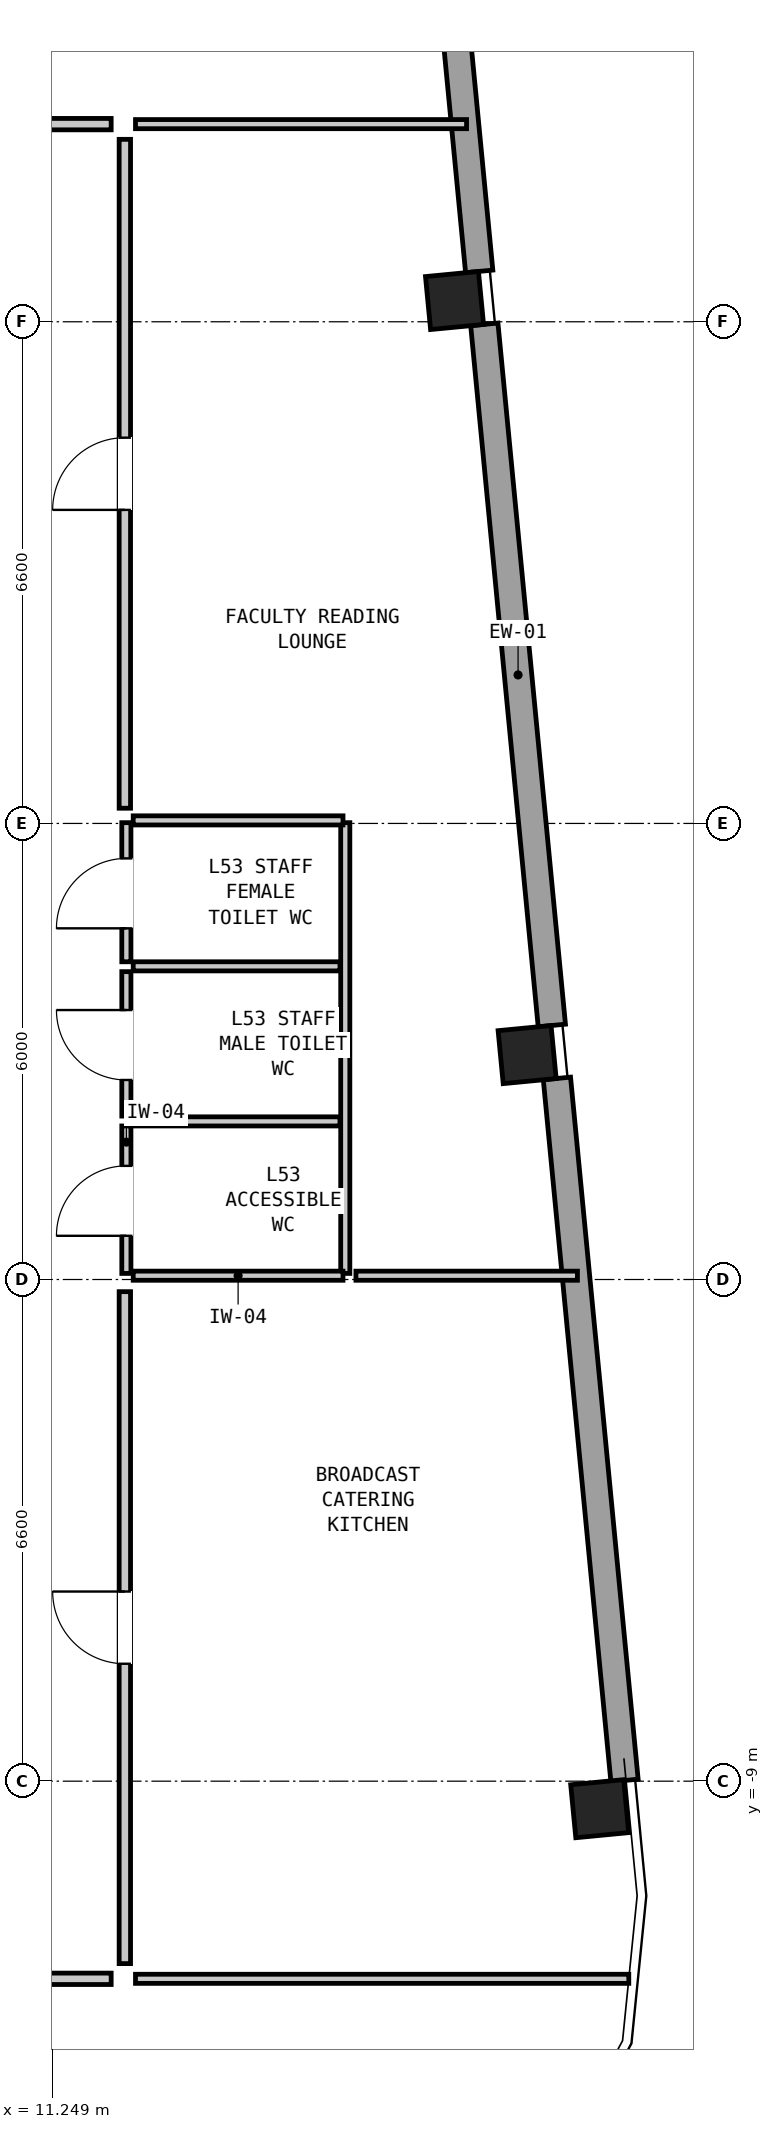
"""IFC4 building model, lengths in metres.
Left out: names, types, materials, properties, quantities, classifications, styles, units other than length and angle.
Written with IfcOpenShell. Run it as: python <this file> out.ifc"""

import sys

from ifc_helpers import new_model, si_unit, direction, frame, frame_2d, origin, origin_2d, place, context, subcontext, project, spatial, rectangle, hollow_rectangle, extrude, element, fill, save


model = new_model("IFC4")
c1 = context("Model", 3, precision=1e-05, world=origin(), true_north=direction((0.0, 1.0)))
c2 = subcontext(c1, "Body", "Model", "MODEL_VIEW")
j1 = project(units=[si_unit("LENGTHUNIT", "METRE"), si_unit("PLANEANGLEUNIT", "RADIAN")], contexts=[c1])
p1 = place(None, origin())
s1 = spatial("IfcSite", under=j1, at=p1, CompositionType="ELEMENT")
p2 = place(p1, origin())
s2 = spatial("IfcBuilding", under=s1, at=p2, CompositionType="ELEMENT")
p3 = place(p2, frame((0.0, 0.0, 180.55)))
s3 = spatial("IfcBuildingStorey", under=s2, at=p3, CompositionType="ELEMENT", Elevation=180.55)
for number, where, z_axis, x_axis in (
    (1, (18.448, -9.362, 0.0), (0.0, 0.0, 1.0), (-0.096, 0.995, 0.0)),
    (2, (17.493, 0.559, 0.0), (0.0, 0.0, 1.0), (-0.096, 0.995, 0.0)),
    (3, (16.537, 10.479, 0.0), (0.0, 0.0, 1.0), (-0.096, 0.995, 0.0)),
):
    element("IfcColumn", number, at=place(p3, frame(where, z_axis=z_axis, x_axis=x_axis)), inside=s3, PredefinedType="COLUMN", context=c2, shape_type="SweptSolid", body=[
        extrude(hollow_rectangle(XDim=0.7, YDim=0.7, WallThickness=0.045, at=origin_2d()), origin(), (0.0, 0.0, 1.0), 3.05),
    ])
p4 = place(p3, frame((15.973, 20.098, 0.0), z_axis=(0.0, 0.0, 1.0), x_axis=(0.095829727039, -0.995397741315, 0.0)))
e4 = element("IfcWall", 4, at=p4, inside=s3, PredefinedType="SOLIDWALL", context=c2, shape_type="SweptSolid", body=[
    extrude(rectangle(XDim=9.279, YDim=0.36, at=frame_2d((4.639, 0.0))), origin(), (0.0, 0.0, 1.0), 0.95),
])
p5 = place(p3, frame((16.929, 10.166, 0.0), z_axis=(0.0, 0.0, 1.0), x_axis=(0.095845939971, -0.995396180318, 0.0)))
e5 = element("IfcWall", 5, at=p5, inside=s3, PredefinedType="SOLIDWALL", context=c2, shape_type="SweptSolid", body=[
    extrude(rectangle(XDim=9.267, YDim=0.36, at=frame_2d((4.633, 0.0))), origin(), (0.0, 0.0, 1.0), 0.95),
])
p6 = place(p3, frame((17.885, 0.245, 0.0), z_axis=(0.0, 0.0, 1.0), x_axis=(0.095829727039, -0.995397741315, 0.0)))
e6 = element("IfcWall", 6, at=p6, inside=s3, PredefinedType="SOLIDWALL", context=c2, shape_type="SweptSolid", body=[
    extrude(rectangle(XDim=9.279, YDim=0.36, at=frame_2d((4.639, 0.0))), origin(), (0.0, 0.0, 1.0), 0.95),
])
p7 = place(p3, frame((12.22, -2.32, 0.0), z_axis=(0.0, 0.0, 1.0), x_axis=(0.0, 1.0, 0.0)))
e7 = element("IfcWall", 7, at=p7, inside=s3, PredefinedType="PARTITIONING", context=c2, shape_type="SweptSolid", body=[
    extrude(rectangle(XDim=1.94, YDim=0.12, at=frame_2d((0.97, 0.0))), origin(), (0.0, 0.0, 1.0), 2.83),
])
p8 = place(p7, frame((0.495, 0.0, 0.0)))
e8 = element("IfcOpeningElement", 8, at=p8, cuts=e7, PredefinedType="OPENING", context=c2, shape_type="SweptSolid", body=[
    extrude(rectangle(XDim=0.92, YDim=2.1, at=frame_2d((0.46, 1.05))), frame((0.0, 0.072, 0.0), z_axis=(0.0, -1.0, 0.0), x_axis=(1.0, 0.0, 0.0)), (0.0, 0.0, 1.0), 0.144),
])
p9 = place(p3, frame((12.22, -0.25, 0.0), z_axis=(0.0, 0.0, 1.0), x_axis=(0.0, 1.0, 0.0)))
e9 = element("IfcWall", 9, at=p9, inside=s3, PredefinedType="PARTITIONING", context=c2, shape_type="SweptSolid", body=[
    extrude(rectangle(XDim=1.9, YDim=0.12, at=frame_2d((0.95, 0.0))), origin(), (0.0, 0.0, 1.0), 2.83),
])
p10 = place(p9, frame((0.475, 0.0, 0.0)))
e10 = element("IfcOpeningElement", 10, at=p10, cuts=e9, PredefinedType="OPENING", context=c2, shape_type="SweptSolid", body=[
    extrude(rectangle(XDim=0.92, YDim=2.1, at=frame_2d((0.46, 1.05))), frame((0.0, 0.072, 0.0), z_axis=(0.0, -1.0, 0.0), x_axis=(1.0, 0.0, 0.0)), (0.0, 0.0, 1.0), 0.144),
])
p11 = place(p3, frame((12.22, 1.78, 0.0), z_axis=(0.0, 0.0, 1.0), x_axis=(0.0, 1.0, 0.0)))
e11 = element("IfcWall", 11, at=p11, inside=s3, PredefinedType="PARTITIONING", context=c2, shape_type="SweptSolid", body=[
    extrude(rectangle(XDim=1.83, YDim=0.12, at=frame_2d((0.915, 0.0))), origin(), (0.0, 0.0, 1.0), 2.83),
])
p12 = place(p11, frame((0.44, 0.0, 0.0)))
e12 = element("IfcOpeningElement", 12, at=p12, cuts=e11, PredefinedType="OPENING", context=c2, shape_type="SweptSolid", body=[
    extrude(rectangle(XDim=0.92, YDim=2.1, at=frame_2d((0.46, 1.05))), frame((0.0, 0.072, 0.0), z_axis=(0.0, -1.0, 0.0), x_axis=(1.0, 0.0, 0.0)), (0.0, 0.0, 1.0), 0.144),
])
p13 = place(p3, frame((15.1, -2.32, 0.0), z_axis=(0.0, 0.0, 1.0), x_axis=(0.0, 1.0, 0.0)))
e13 = element("IfcWall", 13, at=p13, inside=s3, PredefinedType="PARTITIONING", context=c2, shape_type="SweptSolid", body=[
    extrude(rectangle(XDim=5.93, YDim=0.12, at=frame_2d((2.965, 0.0))), origin(), (0.0, 0.0, 1.0), 2.83),
])
for number, where, z_axis, x_axis in (
    (14, (12.31, -2.35, 0.0), (0.0, 0.0, 1.0), (1.0, 0.0, 0.0)),
    (15, (12.31, 3.64, 0.0), (0.0, 0.0, 1.0), (1.0, 0.0, 0.0)),
):
    element("IfcWall", number, at=place(p3, frame(where, z_axis=z_axis, x_axis=x_axis)), inside=s3, PredefinedType="PARTITIONING", context=c2, shape_type="SweptSolid", body=[
        extrude(rectangle(XDim=2.76, YDim=0.12, at=frame_2d((1.38, 0.0))), origin(), (0.0, 0.0, 1.0), 1.01),
    ])
for number, where, z_axis, x_axis in (
    (16, (12.31, -0.32, 0.0), (0.0, 0.0, 1.0), (1.0, 0.0, 0.0)),
    (17, (12.31, 1.72, 0.0), (0.0, 0.0, 1.0), (1.0, 0.0, 0.0)),
):
    element("IfcWall", number, at=place(p3, frame(where, z_axis=z_axis, x_axis=x_axis)), inside=s3, PredefinedType="PARTITIONING", context=c2, shape_type="SweptSolid", body=[
        extrude(rectangle(XDim=2.72, YDim=0.12, at=frame_2d((1.36, 0.0))), origin(), (0.0, 0.0, 1.0), 2.83),
    ])
p14 = place(p3, frame((12.34, 12.8, 0.0), z_axis=(0.0, 0.0, 1.0), x_axis=(1.0, 0.0, 0.0)))
e18 = element("IfcWall", 18, at=p14, inside=s3, PredefinedType="PARTITIONING", context=c2, shape_type="SweptSolid", body=[
    extrude(rectangle(XDim=4.355, YDim=0.12, at=frame_2d((2.178, 0.0))), origin(), (0.0, 0.0, 1.0), 2.83),
])
p15 = place(p3, frame((12.34, -11.6, 0.0), z_axis=(0.0, 0.0, 1.0), x_axis=(1.0, 0.0, 0.0)))
e19 = element("IfcWall", 19, at=p15, inside=s3, PredefinedType="PARTITIONING", context=c2, shape_type="SweptSolid", body=[
    extrude(rectangle(XDim=6.49, YDim=0.12, at=frame_2d((3.245, 0.0))), origin(), (0.0, 0.0, 1.0), 2.347),
])
p16 = place(p3, frame((15.24, -2.35, 0.0), z_axis=(0.0, 0.0, 1.0), x_axis=(1.0, 0.0, 0.0)))
e20 = element("IfcWall", 20, at=p16, inside=s3, PredefinedType="PARTITIONING", context=c2, shape_type="SweptSolid", body=[
    extrude(rectangle(XDim=2.914, YDim=0.12, at=frame_2d((1.457, 0.0))), origin(), (0.0, 0.0, 1.0), 1.01),
])
p17 = place(p3, frame((5.58, 12.8, 0.0), z_axis=(0.0, 0.0, 1.0), x_axis=(1.0, 0.0, 0.0)))
e21 = element("IfcWall", 21, at=p17, inside=s3, PredefinedType="PARTITIONING", context=c2, shape_type="SweptSolid", body=[
    extrude(rectangle(XDim=6.44, YDim=0.15, at=frame_2d((3.22, 0.0))), origin(), (0.0, 0.0, 1.0), 2.83),
])
p18 = place(p17, frame((2.22, 0.0, 0.0)))
e22 = element("IfcOpeningElement", 22, at=p18, cuts=e21, PredefinedType="OPENING", context=c2, shape_type="SweptSolid", body=[
    extrude(rectangle(XDim=1.2, YDim=2.1, at=frame_2d((0.6, 1.05))), frame((0.0, 0.087, 0.0), z_axis=(0.0, -1.0, 0.0), x_axis=(1.0, 0.0, 0.0)), (0.0, 0.0, 1.0), 0.174),
])
p19 = place(p3, frame((0.18, -11.6, 0.0), z_axis=(0.0, 0.0, 1.0), x_axis=(1.0, 0.0, 0.0)))
e23 = element("IfcWall", 23, at=p19, inside=s3, PredefinedType="PARTITIONING", context=c2, shape_type="SweptSolid", body=[
    extrude(rectangle(XDim=11.84, YDim=0.15, at=frame_2d((5.92, 0.0))), origin(), (0.0, 0.0, 1.0), 2.347),
])
p20 = place(p19, frame((5.32, 0.0, 0.0)))
e24 = element("IfcOpeningElement", 24, at=p20, cuts=e23, PredefinedType="OPENING", context=c2, shape_type="SweptSolid", body=[
    extrude(rectangle(XDim=1.2, YDim=2.1, at=frame_2d((0.6, 1.05))), frame((0.0, 0.087, 0.0), z_axis=(0.0, -1.0, 0.0), x_axis=(1.0, 0.0, 0.0)), (0.0, 0.0, 1.0), 0.174),
])
p21 = place(p3, frame((12.2, -11.4, 0.0), z_axis=(0.0, 0.0, 1.0), x_axis=(0.0, 1.0, 0.0)))
e25 = element("IfcWall", 25, at=p21, inside=s3, PredefinedType="PARTITIONING", context=c2, shape_type="SweptSolid", body=[
    extrude(rectangle(XDim=8.84, YDim=0.15, at=frame_2d((4.42, 0.0))), origin(), (0.0, 0.0, 1.0), 2.83),
])
p22 = place(p21, frame((3.945, 0.0, 0.0)))
e26 = element("IfcOpeningElement", 26, at=p22, cuts=e25, PredefinedType="OPENING", context=c2, shape_type="SweptSolid", body=[
    extrude(rectangle(XDim=0.95, YDim=2.1, at=frame_2d((0.475, 1.05))), frame((0.0, 0.087, 0.0), z_axis=(0.0, -1.0, 0.0), x_axis=(1.0, 0.0, 0.0)), (0.0, 0.0, 1.0), 0.174),
])
p23 = place(p3, frame((12.2, 3.8, 0.0), z_axis=(0.0, 0.0, 1.0), x_axis=(0.0, 1.0, 0.0)))
e27 = element("IfcWall", 27, at=p23, inside=s3, PredefinedType="PARTITIONING", context=c2, shape_type="SweptSolid", body=[
    extrude(rectangle(XDim=8.8, YDim=0.15, at=frame_2d((4.4, 0.0))), origin(), (0.0, 0.0, 1.0), 2.83),
])
p24 = place(p23, frame((3.925, 0.0, 0.0)))
e28 = element("IfcOpeningElement", 28, at=p24, cuts=e27, PredefinedType="OPENING", context=c2, shape_type="SweptSolid", body=[
    extrude(rectangle(XDim=0.95, YDim=2.1, at=frame_2d((0.475, 1.05))), frame((0.0, 0.087, 0.0), z_axis=(0.0, -1.0, 0.0), x_axis=(1.0, 0.0, 0.0)), (0.0, 0.0, 1.0), 0.174),
])
p25 = place(p8, origin())
e29 = element("IfcDoor", 29, at=p25, inside=s3, OperationType="SINGLE_SWING_LEFT", PredefinedType="DOOR", context=c2, shape_type="SweptSolid", body=[
    extrude(rectangle(XDim=0.92, YDim=2.1, at=frame_2d((0.46, 1.05))), frame((0.0, 0.025, 0.0), z_axis=(0.0, -1.0, 0.0), x_axis=(1.0, 0.0, 0.0)), (0.0, 0.0, 1.0), 0.05),
])
fill(e8, e29)
p26 = place(p10, origin())
e30 = element("IfcDoor", 30, at=p26, inside=s3, OperationType="SINGLE_SWING_RIGHT", PredefinedType="DOOR", context=c2, shape_type="SweptSolid", body=[
    extrude(rectangle(XDim=0.92, YDim=2.1, at=frame_2d((0.46, 1.05))), frame((0.0, 0.025, 0.0), z_axis=(0.0, -1.0, 0.0), x_axis=(1.0, 0.0, 0.0)), (0.0, 0.0, 1.0), 0.05),
])
fill(e10, e30)
p27 = place(p12, origin())
e31 = element("IfcDoor", 31, at=p27, inside=s3, OperationType="SINGLE_SWING_LEFT", PredefinedType="DOOR", context=c2, shape_type="SweptSolid", body=[
    extrude(rectangle(XDim=0.92, YDim=2.1, at=frame_2d((0.46, 1.05))), frame((0.0, 0.025, 0.0), z_axis=(0.0, -1.0, 0.0), x_axis=(1.0, 0.0, 0.0)), (0.0, 0.0, 1.0), 0.05),
])
fill(e12, e31)
p28 = place(p22, origin())
e32 = element("IfcDoor", 32, at=p28, inside=s3, OperationType="SINGLE_SWING_RIGHT", PredefinedType="DOOR", context=c2, shape_type="SweptSolid", body=[
    extrude(rectangle(XDim=0.95, YDim=2.1, at=frame_2d((0.475, 1.05))), frame((0.0, 0.025, 0.0), z_axis=(0.0, -1.0, 0.0), x_axis=(1.0, 0.0, 0.0)), (0.0, 0.0, 1.0), 0.05),
])
fill(e26, e32)
p29 = place(p24, origin())
e33 = element("IfcDoor", 33, at=p29, inside=s3, OperationType="SINGLE_SWING_LEFT", PredefinedType="DOOR", context=c2, shape_type="SweptSolid", body=[
    extrude(rectangle(XDim=0.95, YDim=2.1, at=frame_2d((0.475, 1.05))), frame((0.0, 0.025, 0.0), z_axis=(0.0, -1.0, 0.0), x_axis=(1.0, 0.0, 0.0)), (0.0, 0.0, 1.0), 0.05),
])
fill(e28, e33)
save(model, sys.argv[1])
